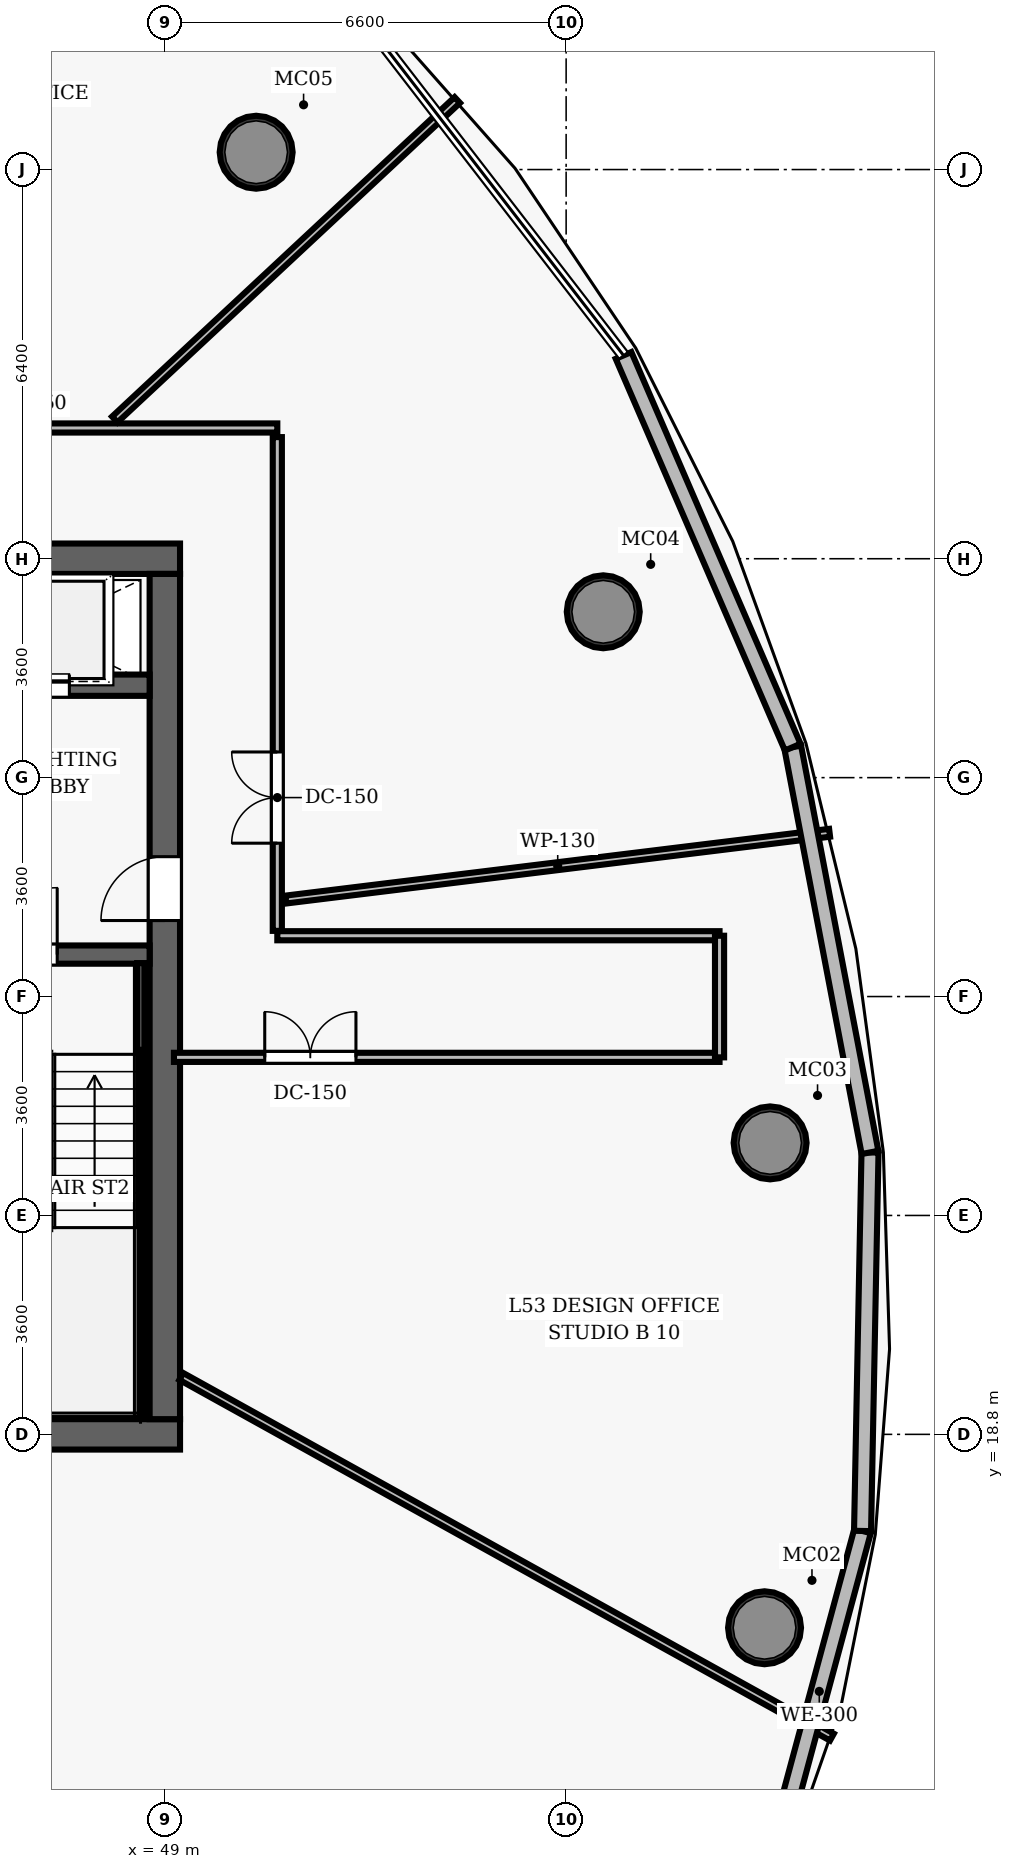
"""IFC4 building model, lengths in metres.
Left out: names, types, materials, properties, quantities, classifications, styles, units other than length and angle.
Written with IfcOpenShell. Run it as: python <this file> out.ifc"""

import sys

from ifc_helpers import new_model, si_unit, direction, frame, frame_2d, origin, origin_2d, place, context, subcontext, project, spatial, rectangle, hollow_circle, extrude, element, fill, save


model = new_model("IFC4")
c1 = context("Model", 3, precision=1e-05, world=origin(), true_north=direction((0.0, 1.0)))
c2 = subcontext(c1, "Body", "Model", "MODEL_VIEW")
j1 = project(units=[si_unit("LENGTHUNIT", "METRE"), si_unit("PLANEANGLEUNIT", "RADIAN")], contexts=[c1])
p1 = place(None, origin())
s1 = spatial("IfcSite", under=j1, at=p1, CompositionType="ELEMENT")
p2 = place(p1, origin())
s2 = spatial("IfcBuilding", under=s1, at=p2, CompositionType="ELEMENT")
p3 = place(p2, frame((0.0, 0.0, 209.7)))
s3 = spatial("IfcBuildingStorey", under=s2, at=p3, CompositionType="ELEMENT", Elevation=209.7)
p4 = place(p3, frame((26.75, 18.8, 0.0), z_axis=(0.0, 0.0, 1.0), x_axis=(1.0, 0.0, 0.0)))
e1 = element("IfcWall", 1, at=p4, inside=s3, PredefinedType="SHEAR", context=c2, shape_type="SweptSolid", body=[
    extrude(rectangle(XDim=22.5, YDim=0.5, at=frame_2d((11.25, 0.0))), origin(), (0.0, 0.0, 1.0), 3.85),
])
p5 = place(p4, frame((14.47, 0.0, 0.0)))
e2 = element("IfcOpeningElement", 2, at=p5, cuts=e1, PredefinedType="OPENING", context=c2, shape_type="SweptSolid", body=[
    extrude(rectangle(XDim=1.05, YDim=2.15, at=frame_2d((0.525, 1.075))), frame((0.0, 0.26, 0.0), z_axis=(0.0, -1.0, 0.0), x_axis=(1.0, 0.0, 0.0)), (0.0, 0.0, 1.0), 0.52),
])
p6 = place(p3, frame((26.75, 33.2, 0.0), z_axis=(0.0, 0.0, 1.0), x_axis=(1.0, 0.0, 0.0)))
e3 = element("IfcWall", 3, at=p6, inside=s3, PredefinedType="SHEAR", context=c2, shape_type="SweptSolid", body=[
    extrude(rectangle(XDim=22.5, YDim=0.5, at=frame_2d((11.25, 0.0))), origin(), (0.0, 0.0, 1.0), 3.85),
])
p7 = place(p6, frame((4.57, 0.0, 0.0)))
e4 = element("IfcOpeningElement", 4, at=p7, cuts=e3, PredefinedType="OPENING", context=c2, shape_type="SweptSolid", body=[
    extrude(rectangle(XDim=1.05, YDim=2.15, at=frame_2d((0.525, 1.075))), frame((0.0, 0.26, 0.0), z_axis=(0.0, -1.0, 0.0), x_axis=(1.0, 0.0, 0.0)), (0.0, 0.0, 1.0), 0.52),
])
p8 = place(p6, frame((14.47, 0.0, 0.0)))
e5 = element("IfcOpeningElement", 5, at=p8, cuts=e3, PredefinedType="OPENING", context=c2, shape_type="SweptSolid", body=[
    extrude(rectangle(XDim=1.05, YDim=2.15, at=frame_2d((0.525, 1.075))), frame((0.0, 0.26, 0.0), z_axis=(0.0, -1.0, 0.0), x_axis=(1.0, 0.0, 0.0)), (0.0, 0.0, 1.0), 0.52),
])
p9 = place(p3, frame((49.0, 19.05, 0.0), z_axis=(0.0, 0.0, 1.0), x_axis=(0.0, 1.0, 0.0)))
e6 = element("IfcWall", 6, at=p9, inside=s3, PredefinedType="SHEAR", context=c2, shape_type="SweptSolid", body=[
    extrude(rectangle(XDim=13.9, YDim=0.5, at=frame_2d((6.95, 0.0))), origin(), (0.0, 0.0, 1.0), 3.85),
])
p10 = place(p9, frame((8.2, 0.0, 0.0)))
e7 = element("IfcOpeningElement", 7, at=p10, cuts=e6, PredefinedType="OPENING", context=c2, shape_type="SweptSolid", body=[
    extrude(rectangle(XDim=1.05, YDim=2.15, at=frame_2d((0.525, 1.075))), frame((0.0, 0.26, 0.0), z_axis=(0.0, -1.0, 0.0), x_axis=(1.0, 0.0, 0.0)), (0.0, 0.0, 1.0), 0.52),
])
for number, where, z_axis, x_axis in (
    (8, (58.863, 15.619, 0.0), (0.0, 0.0, 1.0), (1.0, 0.0, 0.0)),
    (9, (58.955, 23.594, 0.0), (0.0, 0.0, 1.0), (1.0, 0.0, 0.0)),
    (10, (56.21, 32.327, 0.0), (0.0, 0.0, 1.0), (1.0, 0.0, 0.0)),
    (11, (50.502, 39.885, 0.0), (0.0, 0.0, 1.0), (1.0, 0.0, 0.0)),
):
    element("IfcColumn", number, at=place(p3, frame(where, z_axis=z_axis, x_axis=x_axis)), inside=s3, PredefinedType="COLUMN", context=c2, shape_type="SweptSolid", body=[
        extrude(hollow_circle(Radius=0.6, WallThickness=0.05, at=origin_2d()), origin(), (0.0, 0.0, 1.0), 3.85),
    ])
p11 = place(p3, frame((45.08, 26.69, 0.0), z_axis=(0.0, 0.0, 1.0), x_axis=(1.0, 0.0, 0.0)))
e12 = element("IfcWall", 12, at=p11, inside=s3, PredefinedType="SHEAR", context=c2, shape_type="SweptSolid", body=[
    extrude(rectangle(XDim=3.67, YDim=0.3, at=frame_2d((1.835, 0.0))), origin(), (0.0, 0.0, 1.0), 3.85),
])
p12 = place(p11, frame((1.05, 0.0, 0.0)))
e13 = element("IfcOpeningElement", 13, at=p12, cuts=e12, PredefinedType="OPENING", context=c2, shape_type="SweptSolid", body=[
    extrude(rectangle(XDim=1.1, YDim=2.15, at=frame_2d((0.55, 1.075))), frame((0.0, 0.16, 0.0), z_axis=(0.0, -1.0, 0.0), x_axis=(1.0, 0.0, 0.0)), (0.0, 0.0, 1.0), 0.32),
])
p13 = place(p3, frame((48.605, 19.1, 0.0), z_axis=(0.0, 0.0, 1.0), x_axis=(0.0, 1.0, 0.0)))
e14 = element("IfcWall", 14, at=p13, inside=s3, PredefinedType="SHEAR", context=c2, shape_type="SweptSolid", body=[
    extrude(rectangle(XDim=7.45, YDim=0.12, at=frame_2d((3.725, 0.0))), origin(), (0.0, 0.0, 1.0), 3.85),
])
p14 = place(p3, frame((45.51, 19.16, 0.0), z_axis=(0.0, 0.0, 1.0), x_axis=(1.0, 0.0, 0.0)))
e15 = element("IfcWall", 15, at=p14, inside=s3, PredefinedType="SHEAR", context=c2, shape_type="SweptSolid", body=[
    extrude(rectangle(XDim=3.095, YDim=0.12, at=frame_2d((1.547, 0.0))), origin(), (0.0, 0.0, 1.0), 3.85),
])
p15 = place(p3, frame((45.08, 31.12, 0.0), z_axis=(0.0, 0.0, 1.0), x_axis=(1.0, 0.0, 0.0)))
e16 = element("IfcWall", 16, at=p15, inside=s3, PredefinedType="SHEAR", context=c2, shape_type="SweptSolid", body=[
    extrude(rectangle(XDim=3.67, YDim=0.35, at=frame_2d((1.835, 0.0))), origin(), (0.0, 0.0, 1.0), 3.035),
])
p16 = place(p15, frame((1.25, 0.0, 0.0)))
e17 = element("IfcOpeningElement", 17, at=p16, cuts=e16, PredefinedType="OPENING", context=c2, shape_type="SweptSolid", body=[
    extrude(rectangle(XDim=1.1, YDim=2.15, at=frame_2d((0.55, 1.075))), frame((0.0, 0.185, 0.0), z_axis=(0.0, -1.0, 0.0), x_axis=(1.0, 0.0, 0.0)), (0.0, 0.0, 1.0), 0.37),
])
p17 = place(p3, frame((24.85, 35.35, 0.0), z_axis=(0.0, 0.0, 1.0), x_axis=(1.0, 0.0, 0.0)))
e18 = element("IfcWall", 18, at=p17, inside=s3, PredefinedType="PARTITIONING", context=c2, shape_type="SweptSolid", body=[
    extrude(rectangle(XDim=26.0, YDim=0.15, at=frame_2d((13.0, 0.0))), origin(), (0.0, 0.0, 1.0), 3.035),
])
p18 = place(p17, frame((16.182, 0.0, 0.0)))
e19 = element("IfcOpeningElement", 19, at=p18, cuts=e18, PredefinedType="OPENING", context=c2, shape_type="SweptSolid", body=[
    extrude(rectangle(XDim=1.5, YDim=2.2, at=frame_2d((0.75, 1.1))), frame((0.0, 0.085, 0.0), z_axis=(0.0, -1.0, 0.0), x_axis=(1.0, 0.0, 0.0)), (0.0, 0.0, 1.0), 0.17),
])
p19 = place(p17, frame((9.675, 0.0, 0.0)))
e20 = element("IfcOpeningElement", 20, at=p19, cuts=e18, PredefinedType="OPENING", context=c2, shape_type="SweptSolid", body=[
    extrude(rectangle(XDim=0.95, YDim=2.15, at=frame_2d((0.475, 1.075))), frame((0.0, 0.085, 0.0), z_axis=(0.0, -1.0, 0.0), x_axis=(1.0, 0.0, 0.0)), (0.0, 0.0, 1.0), 0.17),
])
p20 = place(p17, frame((5.395, 0.0, 0.0)))
e21 = element("IfcOpeningElement", 21, at=p20, cuts=e18, PredefinedType="OPENING", context=c2, shape_type="SweptSolid", body=[
    extrude(rectangle(XDim=0.95, YDim=2.15, at=frame_2d((0.475, 1.075))), frame((0.0, 0.085, 0.0), z_axis=(0.0, -1.0, 0.0), x_axis=(1.0, 0.0, 0.0)), (0.0, 0.0, 1.0), 0.17),
])
p21 = place(p3, frame((50.85, 27.08, 0.0), z_axis=(0.0, 0.0, 1.0), x_axis=(0.0, 1.0, 0.0)))
e22 = element("IfcWall", 22, at=p21, inside=s3, PredefinedType="PARTITIONING", context=c2, shape_type="SweptSolid", body=[
    extrude(rectangle(XDim=8.12, YDim=0.15, at=frame_2d((4.06, 0.0))), origin(), (0.0, 0.0, 1.0), 3.035),
])
p22 = place(p21, frame((1.442, 0.0, 0.0)))
e23 = element("IfcOpeningElement", 23, at=p22, cuts=e22, PredefinedType="OPENING", context=c2, shape_type="SweptSolid", body=[
    extrude(rectangle(XDim=1.5, YDim=2.2, at=frame_2d((0.75, 1.1))), frame((0.0, 0.085, 0.0), z_axis=(0.0, -1.0, 0.0), x_axis=(1.0, 0.0, 0.0)), (0.0, 0.0, 1.0), 0.17),
])
p23 = place(p3, frame((50.85, 27.0, 0.0), z_axis=(0.0, 0.0, 1.0), x_axis=(1.0, 0.0, 0.0)))
e24 = element("IfcWall", 24, at=p23, inside=s3, PredefinedType="PARTITIONING", context=c2, shape_type="SweptSolid", body=[
    extrude(rectangle(XDim=7.273, YDim=0.15, at=frame_2d((3.636, 0.0))), origin(), (0.0, 0.0, 1.0), 3.035),
])
p24 = place(p3, frame((49.15, 25.0, 0.0), z_axis=(0.0, 0.0, 1.0), x_axis=(1.0, 0.0, 0.0)))
e25 = element("IfcWall", 25, at=p24, inside=s3, PredefinedType="PARTITIONING", context=c2, shape_type="SweptSolid", body=[
    extrude(rectangle(XDim=8.973, YDim=0.15, at=frame_2d((4.487, 0.0))), origin(), (0.0, 0.0, 1.0), 3.035),
])
p25 = place(p24, frame((1.493, 0.0, 0.0)))
e26 = element("IfcOpeningElement", 26, at=p25, cuts=e25, PredefinedType="OPENING", context=c2, shape_type="SweptSolid", body=[
    extrude(rectangle(XDim=1.5, YDim=2.2, at=frame_2d((0.75, 1.1))), frame((0.0, 0.085, 0.0), z_axis=(0.0, -1.0, 0.0), x_axis=(1.0, 0.0, 0.0)), (0.0, 0.0, 1.0), 0.17),
])
p26 = place(p3, frame((58.123, 25.0, 0.0), z_axis=(0.0, 0.0, 1.0), x_axis=(0.0, 1.0, 0.0)))
e27 = element("IfcWall", 27, at=p26, inside=s3, PredefinedType="PARTITIONING", context=c2, shape_type="SweptSolid", body=[
    extrude(rectangle(XDim=2.0, YDim=0.15, at=frame_2d((1.0, 0.0))), origin(), (0.0, 0.0, 1.0), 3.035),
])
p27 = place(p3, frame((50.99, 27.595, 0.0), z_axis=(0.0, 0.0, 1.0), x_axis=(0.992545238003, 0.121876784159, 0.0)))
e28 = element("IfcWall", 28, at=p27, inside=s3, PredefinedType="PARTITIONING", context=c2, shape_type="SweptSolid", body=[
    extrude(rectangle(XDim=9.01, YDim=0.13, at=frame_2d((4.505, 0.0))), origin(), (0.0, 0.0, 1.0), 3.035),
])
p28 = place(p3, frame((48.177, 35.49, 0.0), z_axis=(0.0, 0.0, 1.0), x_axis=(0.731351379183, 0.682000850562, 0.0)))
e29 = element("IfcWall", 29, at=p28, inside=s3, PredefinedType="PARTITIONING", context=c2, shape_type="SweptSolid", body=[
    extrude(rectangle(XDim=7.703, YDim=0.13, at=frame_2d((3.851, 0.0))), origin(), (0.0, 0.0, 1.0), 3.035),
])
p29 = place(p3, frame((42.425, 16.51, 0.0), z_axis=(0.0, 0.0, 1.0), x_axis=(0.422619428182, -0.906307243115, 0.0)))
e30 = element("IfcWall", 30, at=p29, inside=s3, PredefinedType="PARTITIONING", context=c2, shape_type="SweptSolid", body=[
    extrude(rectangle(XDim=14.168, YDim=0.13, at=frame_2d((7.084, 0.0))), origin(), (0.0, 0.0, 1.0), 3.035),
])
p30 = place(p3, frame((49.27, 19.753, 0.0), z_axis=(0.0, 0.0, 1.0), x_axis=(0.874615259577, -0.484817643775, 0.0)))
e31 = element("IfcWall", 31, at=p30, inside=s3, PredefinedType="PARTITIONING", context=c2, shape_type="SweptSolid", body=[
    extrude(rectangle(XDim=12.235, YDim=0.13, at=frame_2d((6.118, 0.0))), origin(), (0.0, 0.0, 1.0), 3.035),
])
p31 = place(p3, frame((60.475, 17.211, 0.0), z_axis=(0.0, 0.0, 1.0), x_axis=(-0.260428483044, -0.965493140949, 0.0)))
e32 = element("IfcWall", 32, at=p31, inside=s3, PredefinedType="SOLIDWALL", context=c2, shape_type="SweptSolid", body=[
    extrude(rectangle(XDim=5.464, YDim=0.28, at=frame_2d((2.732, 0.0))), origin(), (0.0, 0.0, 1.0), 3.62),
])
p32 = place(p3, frame((60.598, 23.437, 0.0), z_axis=(0.0, 0.0, 1.0), x_axis=(-0.019722426899, -0.999805494022, 0.0)))
e33 = element("IfcWall", 33, at=p32, inside=s3, PredefinedType="SOLIDWALL", context=c2, shape_type="SweptSolid", body=[
    extrude(rectangle(XDim=6.227, YDim=0.28, at=frame_2d((3.113, 0.0))), origin(), (0.0, 0.0, 1.0), 3.62),
])
p33 = place(p3, frame((59.327, 30.101, 0.0), z_axis=(0.0, 0.0, 1.0), x_axis=(0.187340299472, -0.982295073893, 0.0)))
e34 = element("IfcWall", 34, at=p33, inside=s3, PredefinedType="SOLIDWALL", context=c2, shape_type="SweptSolid", body=[
    extrude(rectangle(XDim=6.784, YDim=0.28, at=frame_2d((3.392, 0.0))), origin(), (0.0, 0.0, 1.0), 3.62),
])
p34 = place(p3, frame((56.544, 36.543, 0.0), z_axis=(0.0, 0.0, 1.0), x_axis=(0.396499991111, -0.918034725405, 0.0)))
e35 = element("IfcWall", 35, at=p34, inside=s3, PredefinedType="SOLIDWALL", context=c2, shape_type="SweptSolid", body=[
    extrude(rectangle(XDim=7.018, YDim=0.28, at=frame_2d((3.509, 0.0))), origin(), (0.0, 0.0, 1.0), 3.62),
])
p35 = place(p12, origin())
e36 = element("IfcDoor", 36, at=p35, inside=s3, OperationType="SINGLE_SWING_RIGHT", PredefinedType="DOOR", context=c2, shape_type="SweptSolid", body=[
    extrude(rectangle(XDim=1.1, YDim=2.15, at=frame_2d((0.55, 1.075))), frame((0.0, 0.025, 0.0), z_axis=(0.0, -1.0, 0.0), x_axis=(1.0, 0.0, 0.0)), (0.0, 0.0, 1.0), 0.05),
])
fill(e13, e36)
p36 = place(p10, origin())
e37 = element("IfcDoor", 37, at=p36, inside=s3, OperationType="SINGLE_SWING_LEFT", PredefinedType="DOOR", context=c2, shape_type="SweptSolid", body=[
    extrude(rectangle(XDim=1.05, YDim=2.15, at=frame_2d((0.525, 1.075))), frame((0.0, 0.025, 0.0), z_axis=(0.0, -1.0, 0.0), x_axis=(1.0, 0.0, 0.0)), (0.0, 0.0, 1.0), 0.05),
])
fill(e7, e37)
p37 = place(p22, origin())
e38 = element("IfcDoor", 38, at=p37, inside=s3, OperationType="DOUBLE_DOOR_SINGLE_SWING", PredefinedType="DOOR", context=c2, shape_type="SweptSolid", body=[
    extrude(rectangle(XDim=1.5, YDim=2.2, at=frame_2d((0.75, 1.1))), frame((0.0, 0.025, 0.0), z_axis=(0.0, -1.0, 0.0), x_axis=(1.0, 0.0, 0.0)), (0.0, 0.0, 1.0), 0.05),
])
fill(e23, e38)
p38 = place(p25, origin())
e39 = element("IfcDoor", 39, at=p38, inside=s3, OperationType="DOUBLE_DOOR_SINGLE_SWING", PredefinedType="DOOR", context=c2, shape_type="SweptSolid", body=[
    extrude(rectangle(XDim=1.5, YDim=2.2, at=frame_2d((0.75, 1.1))), frame((0.0, 0.025, 0.0), z_axis=(0.0, -1.0, 0.0), x_axis=(1.0, 0.0, 0.0)), (0.0, 0.0, 1.0), 0.05),
])
fill(e26, e39)
p39 = place(p16, origin())
e40 = element("IfcDoor", 40, at=p39, inside=s3, OperationType="SLIDING_TO_LEFT", PredefinedType="DOOR", context=c2, shape_type="SweptSolid", body=[
    extrude(rectangle(XDim=1.1, YDim=2.15, at=frame_2d((0.55, 1.075))), frame((0.0, 0.025, 0.0), z_axis=(0.0, -1.0, 0.0), x_axis=(1.0, 0.0, 0.0)), (0.0, 0.0, 1.0), 0.05),
])
fill(e17, e40)
save(model, sys.argv[1])
